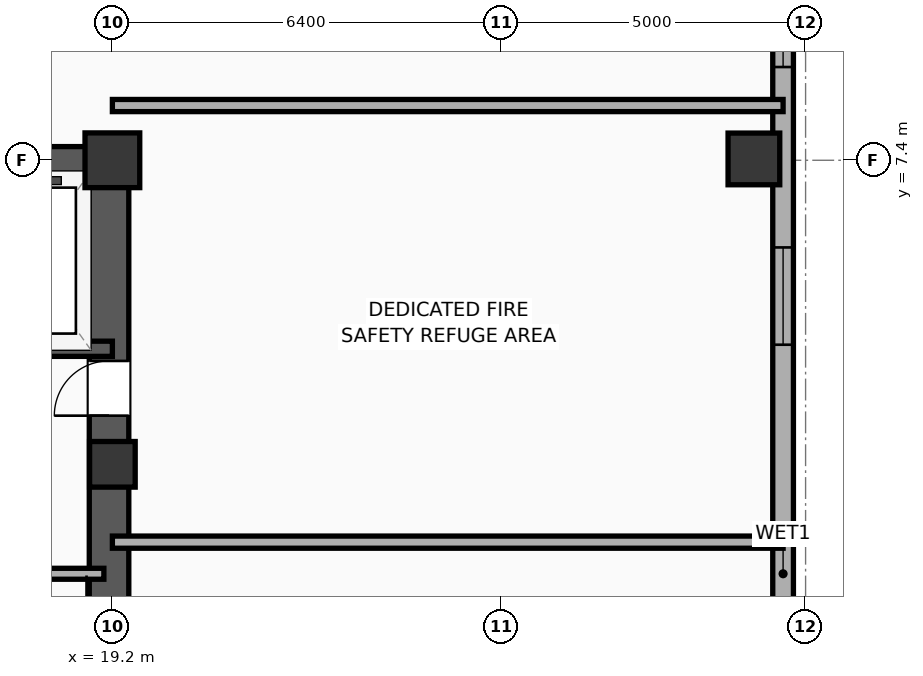
"""IFC4 building model, lengths in metres.
Left out: names, types, materials, properties, quantities, classifications, styles, units other than length and angle.
Written with IfcOpenShell. Run it as: python <this file> out.ifc"""

import sys

from ifc_helpers import new_model, si_unit, direction, frame, frame_2d, origin, origin_2d, place, context, subcontext, project, spatial, rectangle, hollow_rectangle, extrude, element, fill, save


model = new_model("IFC4")
c1 = context("Model", 3, precision=1e-05, world=origin(), true_north=direction((0.0, 1.0)))
c2 = subcontext(c1, "Body", "Model", "MODEL_VIEW")
j1 = project(units=[si_unit("LENGTHUNIT", "METRE"), si_unit("PLANEANGLEUNIT", "RADIAN")], contexts=[c1])
p1 = place(None, origin())
s1 = spatial("IfcSite", under=j1, at=p1, CompositionType="ELEMENT")
p2 = place(p1, origin())
s2 = spatial("IfcBuilding", under=s1, at=p2, CompositionType="ELEMENT")
p3 = place(p2, frame((0.0, 0.0, 195.0)))
s3 = spatial("IfcBuildingStorey", under=s2, at=p3, CompositionType="ELEMENT", Elevation=195.0)
p4 = place(p3, frame((19.2, 2.4, 0.0), z_axis=(0.0, 0.0, 1.0), x_axis=(1.0, 0.0, 0.0)))
e1 = element("IfcColumn", 1, at=p4, inside=s3, PredefinedType="COLUMN", context=c2, shape_type="SweptSolid", body=[
    extrude(rectangle(XDim=0.75, YDim=0.75, at=origin_2d()), origin(), (0.0, 0.0, 1.0), 5.2),
])
p5 = place(p3, frame((19.2, 7.4, 0.0), z_axis=(0.0, 0.0, 1.0), x_axis=(1.0, 0.0, 0.0)))
e2 = element("IfcColumn", 2, at=p5, inside=s3, PredefinedType="COLUMN", context=c2, shape_type="SweptSolid", body=[
    extrude(rectangle(XDim=0.9, YDim=0.9, at=origin_2d()), origin(), (0.0, 0.0, 1.0), 5.2),
])
p6 = place(p3, frame((12.175, 7.4, 0.0), z_axis=(0.0, 0.0, 1.0), x_axis=(1.0, 0.0, 0.0)))
e3 = element("IfcWall", 3, at=p6, inside=s3, PredefinedType="SHEAR", context=c2, shape_type="SweptSolid", body=[
    extrude(rectangle(XDim=7.25, YDim=0.45, at=frame_2d((3.625, 0.0))), origin(), (0.0, 0.0, 1.0), 4.8),
])
p7 = place(p3, frame((19.145, -7.4, 0.0), z_axis=(0.0, 0.0, 1.0), x_axis=(0.0, 1.0, 0.0)))
e4 = element("IfcWall", 4, at=p7, inside=s3, PredefinedType="SHEAR", context=c2, shape_type="SweptSolid", body=[
    extrude(rectangle(XDim=14.8, YDim=0.65, at=frame_2d((7.4, 0.0))), origin(), (0.0, 0.0, 1.0), 4.8),
])
p8 = place(p7, frame((10.6, 0.0, 0.0)))
e5 = element("IfcOpeningElement", 5, at=p8, cuts=e4, PredefinedType="OPENING", context=c2, shape_type="SweptSolid", body=[
    extrude(rectangle(XDim=0.9, YDim=2.05, at=frame_2d((0.45, 1.025))), frame((0.0, 0.335, 0.0), z_axis=(0.0, -1.0, 0.0), x_axis=(1.0, 0.0, 0.0)), (0.0, 0.0, 1.0), 0.67),
])
p9 = place(p3, frame((29.75, 7.422, -0.4), z_axis=(0.0, 0.0, 1.0), x_axis=(1.0, 0.0, 0.0)))
e6 = element("IfcColumn", 6, at=p9, inside=s3, PredefinedType="COLUMN", context=c2, shape_type="SweptSolid", body=[
    extrude(hollow_rectangle(XDim=0.85, YDim=0.85, WallThickness=0.028, at=origin_2d()), origin(), (0.0, 0.0, 1.0), 5.6),
])
p10 = place(p3, frame((30.23, 16.583, 0.0), z_axis=(0.0, 0.0, 1.0), x_axis=(0.0, -1.0, 0.0)))
e7 = element("IfcWall", 7, at=p10, inside=s3, PredefinedType="ELEMENTEDWALL", context=c2, shape_type="SweptSolid", body=[
    extrude(rectangle(XDim=31.967, YDim=0.34, at=frame_2d((15.983, 0.0))), origin(), (0.0, 0.0, 1.0), 3.69),
])
p11 = place(p10, frame((1.483, 0.0, 0.75)))
e8 = element("IfcOpeningElement", 8, at=p11, cuts=e7, PredefinedType="OPENING", context=c2, shape_type="SweptSolid", body=[
    extrude(rectangle(XDim=1.6, YDim=1.4, at=frame_2d((0.8, 0.7))), frame((0.0, 0.18, 0.0), z_axis=(0.0, -1.0, 0.0), x_axis=(1.0, 0.0, 0.0)), (0.0, 0.0, 1.0), 0.36),
])
p12 = place(p10, frame((6.05, 0.0, 0.75)))
e9 = element("IfcOpeningElement", 9, at=p12, cuts=e7, PredefinedType="OPENING", context=c2, shape_type="SweptSolid", body=[
    extrude(rectangle(XDim=1.6, YDim=1.4, at=frame_2d((0.8, 0.7))), frame((0.0, 0.18, 0.0), z_axis=(0.0, -1.0, 0.0), x_axis=(1.0, 0.0, 0.0)), (0.0, 0.0, 1.0), 0.36),
])
p13 = place(p10, frame((10.617, 0.0, 0.75)))
e10 = element("IfcOpeningElement", 10, at=p13, cuts=e7, PredefinedType="OPENING", context=c2, shape_type="SweptSolid", body=[
    extrude(rectangle(XDim=1.6, YDim=1.4, at=frame_2d((0.8, 0.7))), frame((0.0, 0.18, 0.0), z_axis=(0.0, -1.0, 0.0), x_axis=(1.0, 0.0, 0.0)), (0.0, 0.0, 1.0), 0.36),
])
p14 = place(p10, frame((19.75, 0.0, 0.75)))
e11 = element("IfcOpeningElement", 11, at=p14, cuts=e7, PredefinedType="OPENING", context=c2, shape_type="SweptSolid", body=[
    extrude(rectangle(XDim=1.6, YDim=1.4, at=frame_2d((0.8, 0.7))), frame((0.0, 0.18, 0.0), z_axis=(0.0, -1.0, 0.0), x_axis=(1.0, 0.0, 0.0)), (0.0, 0.0, 1.0), 0.36),
])
p15 = place(p10, frame((24.317, 0.0, 0.75)))
e12 = element("IfcOpeningElement", 12, at=p15, cuts=e7, PredefinedType="OPENING", context=c2, shape_type="SweptSolid", body=[
    extrude(rectangle(XDim=1.6, YDim=1.4, at=frame_2d((0.8, 0.7))), frame((0.0, 0.18, 0.0), z_axis=(0.0, -1.0, 0.0), x_axis=(1.0, 0.0, 0.0)), (0.0, 0.0, 1.0), 0.36),
])
p16 = place(p10, frame((28.883, 0.0, 0.75)))
e13 = element("IfcOpeningElement", 13, at=p16, cuts=e7, PredefinedType="OPENING", context=c2, shape_type="SweptSolid", body=[
    extrude(rectangle(XDim=1.6, YDim=1.4, at=frame_2d((0.8, 0.7))), frame((0.0, 0.18, 0.0), z_axis=(0.0, -1.0, 0.0), x_axis=(1.0, 0.0, 0.0)), (0.0, 0.0, 1.0), 0.36),
])
p17 = place(p3, frame((16.6, 4.3, 0.0), z_axis=(0.0, 0.0, 1.0), x_axis=(1.0, 0.0, 0.0)))
e14 = element("IfcWall", 14, at=p17, inside=s3, PredefinedType="SOLIDWALL", context=c2, shape_type="SweptSolid", body=[
    extrude(rectangle(XDim=2.6, YDim=0.25, at=frame_2d((1.3, 0.0))), origin(), (0.0, 0.0, 1.0), 4.8),
])
p18 = place(p3, frame((15.7, 0.6, 0.0), z_axis=(0.0, 0.0, 1.0), x_axis=(1.0, 0.0, 0.0)))
e15 = element("IfcWall", 15, at=p18, inside=s3, PredefinedType="PARTITIONING", context=c2, shape_type="SweptSolid", body=[
    extrude(rectangle(XDim=3.36, YDim=0.18, at=frame_2d((1.68, 0.0))), origin(), (0.0, 0.0, 1.0), 4.8),
])
p19 = place(p18, frame((1.155, 0.0, 0.0)))
e16 = element("IfcOpeningElement", 16, at=p19, cuts=e15, PredefinedType="OPENING", context=c2, shape_type="SweptSolid", body=[
    extrude(rectangle(XDim=1.05, YDim=2.05, at=frame_2d((0.525, 1.025))), frame((0.0, 0.1, 0.0), z_axis=(0.0, -1.0, 0.0), x_axis=(1.0, 0.0, 0.0)), (0.0, 0.0, 1.0), 0.2),
])
for number, where, z_axis, x_axis in (
    (17, (19.2, 1.12, 0.0), (0.0, 0.0, 1.0), (1.0, 0.0, 0.0)),
    (18, (19.2, 8.3, 0.0), (0.0, 0.0, 1.0), (1.0, 0.0, 0.0)),
):
    element("IfcWall", number, at=place(p3, frame(where, z_axis=z_axis, x_axis=x_axis)), inside=s3, PredefinedType="PARTITIONING", context=c2, shape_type="SweptSolid", body=[
        extrude(rectangle(XDim=11.03, YDim=0.2, at=frame_2d((5.515, 0.0))), origin(), (0.0, 0.0, 1.0), 4.8),
    ])
p20 = place(p12, origin())
e19 = element("IfcWindow", 19, at=p20, inside=s3, PartitioningType="SINGLE_PANEL", PredefinedType="WINDOW", context=c2, shape_type="SweptSolid", body=[
    extrude(rectangle(XDim=1.6, YDim=1.4, at=frame_2d((0.8, 0.7))), frame((0.0, 0.03, 0.0), z_axis=(0.0, -1.0, 0.0), x_axis=(1.0, 0.0, 0.0)), (0.0, 0.0, 1.0), 0.06),
])
fill(e9, e19)
p21 = place(p13, origin())
e20 = element("IfcWindow", 20, at=p21, inside=s3, PartitioningType="SINGLE_PANEL", PredefinedType="WINDOW", context=c2, shape_type="SweptSolid", body=[
    extrude(rectangle(XDim=1.6, YDim=1.4, at=frame_2d((0.8, 0.7))), frame((0.0, 0.03, 0.0), z_axis=(0.0, -1.0, 0.0), x_axis=(1.0, 0.0, 0.0)), (0.0, 0.0, 1.0), 0.06),
])
fill(e10, e20)
p22 = place(p8, origin())
e21 = element("IfcDoor", 21, at=p22, inside=s3, OperationType="SINGLE_SWING_LEFT", PredefinedType="DOOR", context=c2, shape_type="SweptSolid", body=[
    extrude(rectangle(XDim=0.9, YDim=2.05, at=frame_2d((0.45, 1.025))), frame((0.0, 0.025, 0.0), z_axis=(0.0, -1.0, 0.0), x_axis=(1.0, 0.0, 0.0)), (0.0, 0.0, 1.0), 0.05),
])
fill(e5, e21)
save(model, sys.argv[1])
